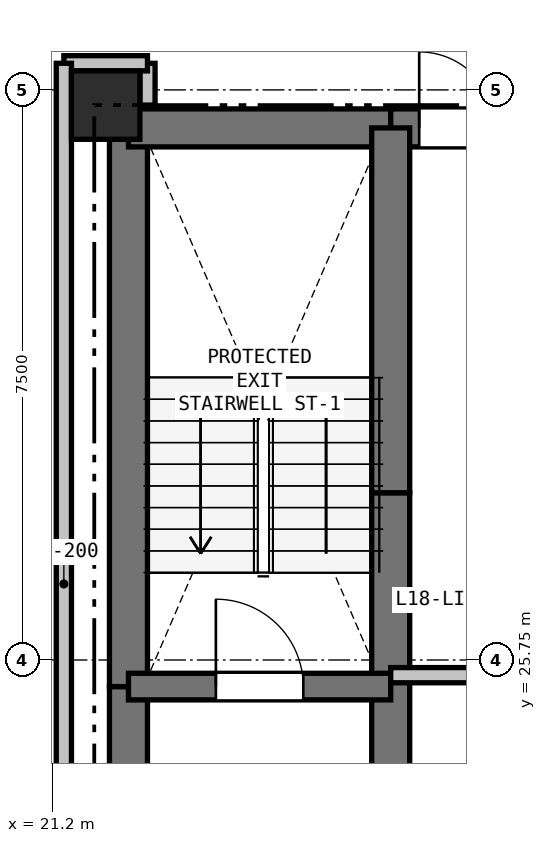
"""IFC4 building model, lengths in metres.
Left out: names, types, materials, properties, quantities, classifications, styles, units other than length and angle.
Written with IfcOpenShell. Run it as: python <this file> out.ifc"""

import sys

from ifc_helpers import new_model, si_unit, direction, frame, frame_2d, origin, origin_2d, place, context, subcontext, project, spatial, rectangle, extrude, element, fill, save


model = new_model("IFC4")
c1 = context("Model", 3, precision=1e-05, world=origin(), true_north=direction((0.0, 1.0)))
c2 = subcontext(c1, "Body", "Model", "MODEL_VIEW")
j1 = project(units=[si_unit("LENGTHUNIT", "METRE"), si_unit("PLANEANGLEUNIT", "RADIAN")], contexts=[c1])
p1 = place(None, origin())
s1 = spatial("IfcSite", under=j1, at=p1, CompositionType="ELEMENT")
p2 = place(p1, origin())
s2 = spatial("IfcBuilding", under=s1, at=p2, CompositionType="ELEMENT")
p3 = place(p2, frame((0.0, 0.0, 66.9)))
s3 = spatial("IfcBuildingStorey", under=s2, at=p3, CompositionType="ELEMENT", Elevation=66.9)
p4 = place(p3, frame((21.9, 33.05, 0.0), z_axis=(0.0, 0.0, 1.0), x_axis=(1.0, 0.0, 0.0)))
e1 = element("IfcColumn", 1, at=p4, inside=s3, PredefinedType="COLUMN", context=c2, shape_type="SweptSolid", body=[
    extrude(rectangle(XDim=0.9, YDim=0.9, at=origin_2d()), origin(), (0.0, 0.0, 1.0), 6.6),
])
for number, where, z_axis, x_axis in (
    (2, (7.087, 28.11, 0.0), (0.0, 0.0, 1.0), (0.866, 0.5, 0.0)),
    (3, (38.779, 7.092, 0.0), (0.0, 0.0, 1.0), (-0.866, 0.5, 0.0)),
):
    element("IfcWall", number, at=place(p3, frame(where, z_axis=z_axis, x_axis=x_axis)), inside=s3, PredefinedType="SOLIDWALL", context=c2, shape_type="SweptSolid", body=[
        extrude(rectangle(XDim=36.595, YDim=0.25, at=frame_2d((18.297, 0.0))), origin(), (0.0, 0.0, 1.0), 5.723),
    ])
p5 = place(p3, frame((22.2, 20.75, 0.0), z_axis=(0.0, 0.0, 1.0), x_axis=(0.0, 1.0, 0.0)))
e4 = element("IfcWall", 4, at=p5, inside=s3, PredefinedType="SHEAR", context=c2, shape_type="SweptSolid", body=[
    extrude(rectangle(XDim=4.65, YDim=0.5, at=frame_2d((2.325, 0.0))), origin(), (0.0, 0.0, 1.0), 6.35),
])
p6 = place(p3, frame((22.2, 25.4, 0.0), z_axis=(0.0, 0.0, 1.0), x_axis=(0.0, 1.0, 0.0)))
e5 = element("IfcWall", 5, at=p6, inside=s3, PredefinedType="SHEAR", context=c2, shape_type="SweptSolid", body=[
    extrude(rectangle(XDim=7.35, YDim=0.5, at=frame_2d((3.675, 0.0))), origin(), (0.0, 0.0, 1.0), 6.35),
])
p7 = place(p3, frame((22.2, 32.75, 0.0), z_axis=(0.0, 0.0, 1.0), x_axis=(1.0, 0.0, 0.0)))
e6 = element("IfcWall", 6, at=p7, inside=s3, PredefinedType="SHEAR", context=c2, shape_type="SweptSolid", body=[
    extrude(rectangle(XDim=3.45, YDim=0.5, at=frame_2d((1.725, 0.0))), origin(), (0.0, 0.0, 1.0), 6.35),
])
p8 = place(p3, frame((25.65, 32.75, 0.0), z_axis=(0.0, 0.0, 1.0), x_axis=(1.0, 0.0, 0.0)))
e7 = element("IfcWall", 7, at=p8, inside=s3, PredefinedType="SHEAR", context=c2, shape_type="SweptSolid", body=[
    extrude(rectangle(XDim=1.75, YDim=0.5, at=frame_2d((0.875, 0.0))), origin(), (0.0, 0.0, 1.0), 6.35),
])
p9 = place(p8, frame((0.375, 0.0, 0.0)))
e8 = element("IfcOpeningElement", 8, at=p9, cuts=e7, PredefinedType="OPENING", context=c2, shape_type="SweptSolid", body=[
    extrude(rectangle(XDim=1.0, YDim=2.15, at=frame_2d((0.5, 1.075))), frame((0.0, 0.26, 0.0), z_axis=(0.0, -1.0, 0.0), x_axis=(1.0, 0.0, 0.0)), (0.0, 0.0, 1.0), 0.52),
])
p10 = place(p3, frame((25.65, 22.75, 0.0), z_axis=(0.0, 0.0, 1.0), x_axis=(0.0, 1.0, 0.0)))
e9 = element("IfcWall", 9, at=p10, inside=s3, PredefinedType="SHEAR", context=c2, shape_type="SweptSolid", body=[
    extrude(rectangle(XDim=2.8, YDim=0.5, at=frame_2d((1.4, 0.0))), origin(), (0.0, 0.0, 1.0), 6.35),
])
p11 = place(p3, frame((25.65, 25.55, 0.0), z_axis=(0.0, 0.0, 1.0), x_axis=(0.0, 1.0, 0.0)))
e10 = element("IfcWall", 10, at=p11, inside=s3, PredefinedType="SHEAR", context=c2, shape_type="SweptSolid", body=[
    extrude(rectangle(XDim=2.4, YDim=0.5, at=frame_2d((1.2, 0.0))), origin(), (0.0, 0.0, 1.0), 6.35),
])
p12 = place(p3, frame((25.65, 27.95, 0.0), z_axis=(0.0, 0.0, 1.0), x_axis=(0.0, 1.0, 0.0)))
e11 = element("IfcWall", 11, at=p12, inside=s3, PredefinedType="SHEAR", context=c2, shape_type="SweptSolid", body=[
    extrude(rectangle(XDim=4.8, YDim=0.5, at=frame_2d((2.4, 0.0))), origin(), (0.0, 0.0, 1.0), 6.35),
])
p13 = place(p3, frame((22.2, 25.4, 0.0), z_axis=(0.0, 0.0, 1.0), x_axis=(1.0, 0.0, 0.0)))
e12 = element("IfcWall", 12, at=p13, inside=s3, PredefinedType="SHEAR", context=c2, shape_type="SweptSolid", body=[
    extrude(rectangle(XDim=3.45, YDim=0.35, at=frame_2d((1.725, 0.0))), origin(), (0.0, 0.0, 1.0), 6.35),
])
p14 = place(p13, frame((1.15, 0.0, 0.0)))
e13 = element("IfcOpeningElement", 13, at=p14, cuts=e12, PredefinedType="OPENING", context=c2, shape_type="SweptSolid", body=[
    extrude(rectangle(XDim=1.15, YDim=2.15, at=frame_2d((0.575, 1.075))), frame((0.0, 0.185, 0.0), z_axis=(0.0, -1.0, 0.0), x_axis=(1.0, 0.0, 0.0)), (0.0, 0.0, 1.0), 0.37),
])
p15 = place(p3, frame((25.65, 25.55, 0.0), z_axis=(0.0, 0.0, 1.0), x_axis=(1.0, 0.0, 0.0)))
e14 = element("IfcWall", 14, at=p15, inside=s3, PredefinedType="PARTITIONING", context=c2, shape_type="SweptSolid", body=[
    extrude(rectangle(XDim=4.95, YDim=0.2, at=frame_2d((2.475, 0.0))), origin(), (0.0, 0.0, 1.0), 6.35),
])
p16 = place(p3, frame((22.45, 33.05, 0.0), z_axis=(0.0, 0.0, 1.0), x_axis=(0.0, 1.0, 0.0)))
e15 = element("IfcWall", 15, at=p16, inside=s3, PredefinedType="PARTITIONING", context=c2, shape_type="SweptSolid", body=[
    extrude(rectangle(XDim=0.55, YDim=0.2, at=frame_2d((0.275, 0.0))), origin(), (0.0, 0.0, 1.0), 5.798),
])
p17 = place(p3, frame((22.45, 33.6, 0.0), z_axis=(0.0, 0.0, 1.0), x_axis=(-1.0, 0.0, 0.0)))
e16 = element("IfcWall", 16, at=p17, inside=s3, PredefinedType="PARTITIONING", context=c2, shape_type="SweptSolid", body=[
    extrude(rectangle(XDim=1.1, YDim=0.2, at=frame_2d((0.55, 0.0))), origin(), (0.0, 0.0, 1.0), 6.35),
])
p18 = place(p3, frame((21.35, 33.6, 0.0), z_axis=(0.0, 0.0, 1.0), x_axis=(0.0, -1.0, 0.0)))
e17 = element("IfcWall", 17, at=p18, inside=s3, PredefinedType="PARTITIONING", context=c2, shape_type="SweptSolid", body=[
    extrude(rectangle(XDim=13.7, YDim=0.2, at=frame_2d((6.85, 0.0))), origin(), (0.0, 0.0, 1.0), 5.723),
])
p19 = place(p9, origin())
e18 = element("IfcDoor", 18, at=p19, inside=s3, OperationType="SINGLE_SWING_LEFT", PredefinedType="DOOR", context=c2, shape_type="SweptSolid", body=[
    extrude(rectangle(XDim=1.0, YDim=2.15, at=frame_2d((0.5, 1.075))), frame((0.0, 0.025, 0.0), z_axis=(0.0, -1.0, 0.0), x_axis=(1.0, 0.0, 0.0)), (0.0, 0.0, 1.0), 0.05),
])
fill(e8, e18)
p20 = place(p14, origin())
e19 = element("IfcDoor", 19, at=p20, inside=s3, OperationType="SINGLE_SWING_LEFT", PredefinedType="DOOR", context=c2, shape_type="SweptSolid", body=[
    extrude(rectangle(XDim=1.15, YDim=2.15, at=frame_2d((0.575, 1.075))), frame((0.0, 0.025, 0.0), z_axis=(0.0, -1.0, 0.0), x_axis=(1.0, 0.0, 0.0)), (0.0, 0.0, 1.0), 0.05),
])
fill(e13, e19)
save(model, sys.argv[1])
